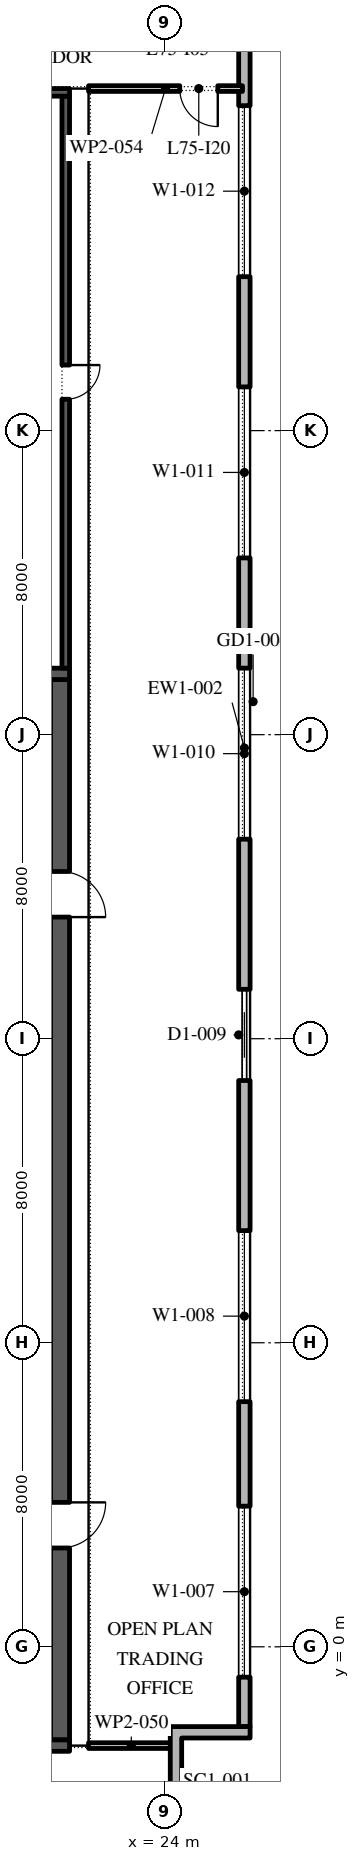
"""IFC4 building model, lengths in metres.
Left out: names, types, materials, properties, quantities, classifications, styles, units other than length and angle.
Written with IfcOpenShell. Run it as: python <this file> out.ifc"""

import sys

from ifc_helpers import new_model, si_unit, direction, frame, frame_2d, origin, place, context, subcontext, project, spatial, polyline, rectangle, outline, extrude, element, fill, save


model = new_model("IFC4")
c1 = context("Model", 3, precision=1e-05, world=origin(), true_north=direction((0.0, 1.0)))
c2 = subcontext(c1, "Body", "Model", "MODEL_VIEW")
j1 = project(units=[si_unit("LENGTHUNIT", "METRE"), si_unit("PLANEANGLEUNIT", "RADIAN")], contexts=[c1])
p1 = place(None, origin())
s1 = spatial("IfcSite", under=j1, at=p1, CompositionType="ELEMENT")
p2 = place(p1, origin())
s2 = spatial("IfcBuilding", under=s1, at=p2, CompositionType="ELEMENT")
p3 = place(p2, frame((0.0, 0.0, 342.6)))
s3 = spatial("IfcBuildingStorey", under=s2, at=p3, CompositionType="ELEMENT", Elevation=342.6)
p4 = place(p3, frame((26.1, -2.1, 0.0), z_axis=(0.0, 0.0, 1.0), x_axis=(0.0, 1.0, 0.0)))
e1 = element("IfcWall", 1, at=p4, inside=s3, PredefinedType="STANDARD", context=c2, shape_type="SweptSolid", body=[
    extrude(rectangle(XDim=51.5, YDim=0.3, at=frame_2d((25.75, 0.0))), origin(), (0.0, 0.0, 1.0), 4.0),
])
p5 = place(p4, frame((1.3, 0.0, 0.45)))
e2 = element("IfcOpeningElement", 2, at=p5, cuts=e1, PredefinedType="OPENING", context=c2, shape_type="SweptSolid", body=[
    extrude(rectangle(XDim=4.5, YDim=3.05, at=frame_2d((2.25, 1.525))), frame((0.0, 0.16, 0.0), z_axis=(0.0, -1.0, 0.0), x_axis=(1.0, 0.0, 0.0)), (0.0, 0.0, 1.0), 0.32),
])
p6 = place(p4, frame((8.55, 0.0, 0.45)))
e3 = element("IfcOpeningElement", 3, at=p6, cuts=e1, PredefinedType="OPENING", context=c2, shape_type="SweptSolid", body=[
    extrude(rectangle(XDim=4.5, YDim=3.05, at=frame_2d((2.25, 1.525))), frame((0.0, 0.16, 0.0), z_axis=(0.0, -1.0, 0.0), x_axis=(1.0, 0.0, 0.0)), (0.0, 0.0, 1.0), 0.32),
])
p7 = place(p4, frame((17.0, 0.0, 0.0)))
e4 = element("IfcOpeningElement", 4, at=p7, cuts=e1, PredefinedType="OPENING", context=c2, shape_type="SweptSolid", body=[
    extrude(rectangle(XDim=2.4, YDim=3.5, at=frame_2d((1.2, 1.75))), frame((0.0, 0.16, 0.0), z_axis=(0.0, -1.0, 0.0), x_axis=(1.0, 0.0, 0.0)), (0.0, 0.0, 1.0), 0.32),
])
p8 = place(p4, frame((23.35, 0.0, 0.45)))
e5 = element("IfcOpeningElement", 5, at=p8, cuts=e1, PredefinedType="OPENING", context=c2, shape_type="SweptSolid", body=[
    extrude(rectangle(XDim=4.5, YDim=3.05, at=frame_2d((2.25, 1.525))), frame((0.0, 0.16, 0.0), z_axis=(0.0, -1.0, 0.0), x_axis=(1.0, 0.0, 0.0)), (0.0, 0.0, 1.0), 0.32),
])
p9 = place(p4, frame((30.75, 0.0, 0.45)))
e6 = element("IfcOpeningElement", 6, at=p9, cuts=e1, PredefinedType="OPENING", context=c2, shape_type="SweptSolid", body=[
    extrude(rectangle(XDim=4.5, YDim=3.05, at=frame_2d((2.25, 1.525))), frame((0.0, 0.16, 0.0), z_axis=(0.0, -1.0, 0.0), x_axis=(1.0, 0.0, 0.0)), (0.0, 0.0, 1.0), 0.32),
])
p10 = place(p4, frame((38.15, 0.0, 0.45)))
e7 = element("IfcOpeningElement", 7, at=p10, cuts=e1, PredefinedType="OPENING", context=c2, shape_type="SweptSolid", body=[
    extrude(rectangle(XDim=4.5, YDim=3.05, at=frame_2d((2.25, 1.525))), frame((0.0, 0.16, 0.0), z_axis=(0.0, -1.0, 0.0), x_axis=(1.0, 0.0, 0.0)), (0.0, 0.0, 1.0), 0.32),
])
p11 = place(p4, frame((46.6, 0.0, 0.0)))
e8 = element("IfcOpeningElement", 8, at=p11, cuts=e1, PredefinedType="OPENING", context=c2, shape_type="SweptSolid", body=[
    extrude(rectangle(XDim=2.4, YDim=3.5, at=frame_2d((1.2, 1.75))), frame((0.0, 0.16, 0.0), z_axis=(0.0, -1.0, 0.0), x_axis=(1.0, 0.0, 0.0)), (0.0, 0.0, 1.0), 0.32),
])
p12 = place(p3, origin())
e9 = element("IfcWall", 9, at=p12, inside=s3, PredefinedType="STANDARD", context=c2, shape_type="SweptSolid", body=[
    extrude(outline(polyline([(24.15, -3.9), (24.15, -2.1), (26.25, -2.1), (26.25, -2.4), (24.45, -2.4), (24.45, -4.2), (22.65, -4.2), (22.65, -5.7), (22.35, -5.7), (22.35, -3.9), (24.15, -3.9)])), origin(), (0.0, 0.0, 1.0), 4.0),
])
p13 = place(p3, frame((21.25, -2.45, 0.0), z_axis=(0.0, 0.0, 1.0), x_axis=(0.0, 1.0, 0.0)))
e10 = element("IfcWall", 10, at=p13, inside=s3, PredefinedType="SHEAR", context=c2, shape_type="SweptSolid", body=[
    extrude(rectangle(XDim=27.9, YDim=0.5, at=frame_2d((13.95, 0.0))), origin(), (0.0, 0.0, 1.0), 4.0),
])
p14 = place(p13, frame((5.05, 0.0, 0.0)))
e11 = element("IfcOpeningElement", 11, at=p14, cuts=e10, PredefinedType="OPENING", context=c2, shape_type="SweptSolid", body=[
    extrude(rectangle(XDim=1.2, YDim=2.1, at=frame_2d((0.6, 1.05))), frame((0.0, 0.26, 0.0), z_axis=(0.0, -1.0, 0.0), x_axis=(1.0, 0.0, 0.0)), (0.0, 0.0, 1.0), 0.52),
])
p15 = place(p13, frame((21.65, 0.0, 0.0)))
e12 = element("IfcOpeningElement", 12, at=p15, cuts=e10, PredefinedType="OPENING", context=c2, shape_type="SweptSolid", body=[
    extrude(rectangle(XDim=1.2, YDim=2.1, at=frame_2d((0.6, 1.05))), frame((0.0, 0.26, 0.0), z_axis=(0.0, -1.0, 0.0), x_axis=(1.0, 0.0, 0.0)), (0.0, 0.0, 1.0), 0.52),
])
for number, where, z_axis, x_axis in (
    (13, (10.5, -2.6, 0.0), (0.0, 0.0, 1.0), (1.0, 0.0, 0.0)),
    (14, (10.5, 25.6, 0.0), (0.0, 0.0, 1.0), (1.0, 0.0, 0.0)),
):
    element("IfcWall", number, at=place(p3, frame(where, z_axis=z_axis, x_axis=x_axis)), inside=s3, PredefinedType="SHEAR", context=c2, shape_type="SweptSolid", body=[
        extrude(rectangle(XDim=11.0, YDim=0.3, at=frame_2d((5.5, 0.0))), origin(), (0.0, 0.0, 1.0), 4.0),
    ])
p16 = place(p3, frame((21.4, 25.75, 0.0), z_axis=(0.0, 0.0, 1.0), x_axis=(0.0, 1.0, 0.0)))
e15 = element("IfcWall", 15, at=p16, inside=s3, PredefinedType="SHEAR", context=c2, shape_type="SweptSolid", body=[
    extrude(rectangle(XDim=15.05, YDim=0.2, at=frame_2d((7.525, 0.0))), origin(), (0.0, 0.0, 1.0), 4.0),
])
p17 = place(p16, frame((7.075, 0.0, 0.0)))
e16 = element("IfcOpeningElement", 16, at=p17, cuts=e15, PredefinedType="OPENING", context=c2, shape_type="SweptSolid", body=[
    extrude(rectangle(XDim=0.9, YDim=2.1, at=frame_2d((0.45, 1.05))), frame((0.0, 0.11, 0.0), z_axis=(0.0, -1.0, 0.0), x_axis=(1.0, 0.0, 0.0)), (0.0, 0.0, 1.0), 0.22),
])
p18 = place(p3, frame((10.5, 40.9, 0.0), z_axis=(0.0, 0.0, 1.0), x_axis=(1.0, 0.0, 0.0)))
e17 = element("IfcWall", 17, at=p18, inside=s3, PredefinedType="SHEAR", context=c2, shape_type="SweptSolid", body=[
    extrude(rectangle(XDim=11.0, YDim=0.2, at=frame_2d((5.5, 0.0))), origin(), (0.0, 0.0, 1.0), 4.0),
])
p19 = place(p3, frame((22.0, -2.6, 0.0), z_axis=(0.0, 0.0, 1.0), x_axis=(1.0, 0.0, 0.0)))
e18 = element("IfcWall", 18, at=p19, inside=s3, PredefinedType="PARTITIONING", context=c2, shape_type="SweptSolid", body=[
    extrude(rectangle(XDim=2.25, YDim=0.15, at=frame_2d((1.125, 0.0))), origin(), (0.0, 0.0, 1.0), 4.0),
])
p20 = place(p3, frame((26.05, 41.0, 0.0), z_axis=(0.0, 0.0, 1.0), x_axis=(-1.0, 0.0, 0.0)))
e19 = element("IfcWall", 19, at=p20, inside=s3, PredefinedType="PARTITIONING", context=c2, shape_type="SweptSolid", body=[
    extrude(rectangle(XDim=4.05, YDim=0.15, at=frame_2d((2.025, 0.0))), origin(), (0.0, 0.0, 1.0), 4.0),
])
p21 = place(p20, frame((0.65, 0.0, 0.0)))
e20 = element("IfcOpeningElement", 20, at=p21, cuts=e19, PredefinedType="OPENING", context=c2, shape_type="SweptSolid", body=[
    extrude(rectangle(XDim=1.0, YDim=2.1, at=frame_2d((0.5, 1.05))), frame((0.0, 0.085, 0.0), z_axis=(0.0, -1.0, 0.0), x_axis=(1.0, 0.0, 0.0)), (0.0, 0.0, 1.0), 0.17),
])
p22 = place(p5, origin())
e21 = element("IfcWindow", 21, at=p22, inside=s3, PartitioningType="DOUBLE_PANEL_VERTICAL", PredefinedType="WINDOW", context=c2, shape_type="SweptSolid", body=[
    extrude(rectangle(XDim=4.5, YDim=3.05, at=frame_2d((2.25, 1.525))), frame((0.0, 0.03, 0.0), z_axis=(0.0, -1.0, 0.0), x_axis=(1.0, 0.0, 0.0)), (0.0, 0.0, 1.0), 0.06),
])
fill(e2, e21)
p23 = place(p6, origin())
e22 = element("IfcWindow", 22, at=p23, inside=s3, PartitioningType="DOUBLE_PANEL_VERTICAL", PredefinedType="WINDOW", context=c2, shape_type="SweptSolid", body=[
    extrude(rectangle(XDim=4.5, YDim=3.05, at=frame_2d((2.25, 1.525))), frame((0.0, 0.03, 0.0), z_axis=(0.0, -1.0, 0.0), x_axis=(1.0, 0.0, 0.0)), (0.0, 0.0, 1.0), 0.06),
])
fill(e3, e22)
p24 = place(p7, origin())
e23 = element("IfcDoor", 23, at=p24, inside=s3, OperationType="DOUBLE_DOOR_SLIDING", PredefinedType="DOOR", context=c2, shape_type="SweptSolid", body=[
    extrude(rectangle(XDim=2.4, YDim=3.5, at=frame_2d((1.2, 1.75))), frame((0.0, 0.025, 0.0), z_axis=(0.0, -1.0, 0.0), x_axis=(1.0, 0.0, 0.0)), (0.0, 0.0, 1.0), 0.05),
])
fill(e4, e23)
p25 = place(p8, origin())
e24 = element("IfcWindow", 24, at=p25, inside=s3, PartitioningType="DOUBLE_PANEL_VERTICAL", PredefinedType="WINDOW", context=c2, shape_type="SweptSolid", body=[
    extrude(rectangle(XDim=4.5, YDim=3.05, at=frame_2d((2.25, 1.525))), frame((0.0, 0.03, 0.0), z_axis=(0.0, -1.0, 0.0), x_axis=(1.0, 0.0, 0.0)), (0.0, 0.0, 1.0), 0.06),
])
fill(e5, e24)
p26 = place(p9, origin())
e25 = element("IfcWindow", 25, at=p26, inside=s3, PartitioningType="DOUBLE_PANEL_VERTICAL", PredefinedType="WINDOW", context=c2, shape_type="SweptSolid", body=[
    extrude(rectangle(XDim=4.5, YDim=3.05, at=frame_2d((2.25, 1.525))), frame((0.0, 0.03, 0.0), z_axis=(0.0, -1.0, 0.0), x_axis=(1.0, 0.0, 0.0)), (0.0, 0.0, 1.0), 0.06),
])
fill(e6, e25)
p27 = place(p10, origin())
e26 = element("IfcWindow", 26, at=p27, inside=s3, PartitioningType="DOUBLE_PANEL_VERTICAL", PredefinedType="WINDOW", context=c2, shape_type="SweptSolid", body=[
    extrude(rectangle(XDim=4.5, YDim=3.05, at=frame_2d((2.25, 1.525))), frame((0.0, 0.03, 0.0), z_axis=(0.0, -1.0, 0.0), x_axis=(1.0, 0.0, 0.0)), (0.0, 0.0, 1.0), 0.06),
])
fill(e7, e26)
p28 = place(p14, frame((1.2, 0.0, 0.0), z_axis=(0.0, 0.0, 1.0), x_axis=(-1.0, 0.0, 0.0)))
e27 = element("IfcDoor", 27, at=p28, inside=s3, OperationType="SINGLE_SWING_RIGHT", PredefinedType="DOOR", context=c2, shape_type="SweptSolid", body=[
    extrude(rectangle(XDim=1.2, YDim=2.1, at=frame_2d((0.6, 1.05))), frame((0.0, 0.025, 0.0), z_axis=(0.0, -1.0, 0.0), x_axis=(1.0, 0.0, 0.0)), (0.0, 0.0, 1.0), 0.05),
])
fill(e11, e27)
p29 = place(p15, frame((1.2, 0.0, 0.0), z_axis=(0.0, 0.0, 1.0), x_axis=(-1.0, 0.0, 0.0)))
e28 = element("IfcDoor", 28, at=p29, inside=s3, OperationType="SINGLE_SWING_LEFT", PredefinedType="DOOR", context=c2, shape_type="SweptSolid", body=[
    extrude(rectangle(XDim=1.2, YDim=2.1, at=frame_2d((0.6, 1.05))), frame((0.0, 0.025, 0.0), z_axis=(0.0, -1.0, 0.0), x_axis=(1.0, 0.0, 0.0)), (0.0, 0.0, 1.0), 0.05),
])
fill(e12, e28)
p30 = place(p17, frame((0.9, 0.15, 0.0), z_axis=(0.0, 0.0, 1.0), x_axis=(-1.0, 0.0, 0.0)))
e29 = element("IfcDoor", 29, at=p30, inside=s3, OperationType="SINGLE_SWING_RIGHT", PredefinedType="DOOR", context=c2, shape_type="SweptSolid", body=[
    extrude(rectangle(XDim=0.9, YDim=2.1, at=frame_2d((0.45, 1.05))), frame((0.0, 0.1, 0.0), z_axis=(0.0, -1.0, 0.0), x_axis=(1.0, 0.0, 0.0)), (0.0, 0.0, 1.0), 0.05),
])
fill(e16, e29)
p31 = place(p21, origin())
e30 = element("IfcDoor", 30, at=p31, inside=s3, OperationType="SINGLE_SWING_RIGHT", PredefinedType="DOOR", context=c2, shape_type="SweptSolid", body=[
    extrude(rectangle(XDim=1.0, YDim=2.1, at=frame_2d((0.5, 1.05))), frame((0.0, 0.025, 0.0), z_axis=(0.0, -1.0, 0.0), x_axis=(1.0, 0.0, 0.0)), (0.0, 0.0, 1.0), 0.05),
])
fill(e20, e30)
save(model, sys.argv[1])
